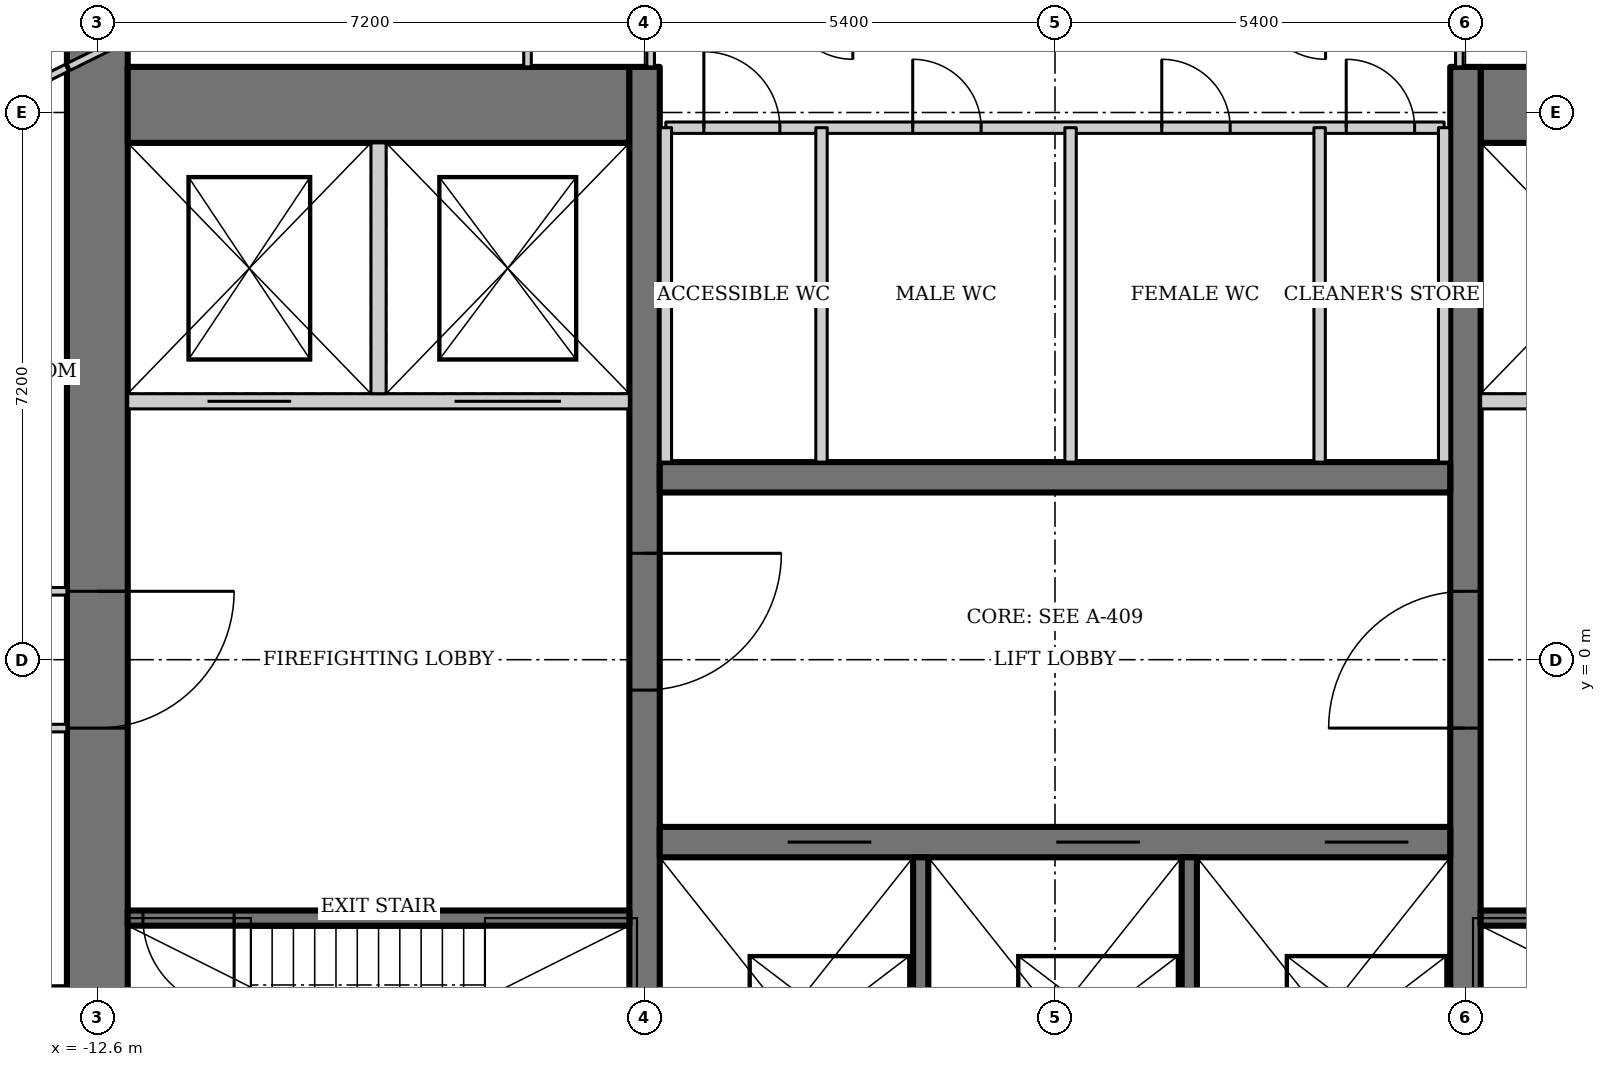
"""IFC4 building model, lengths in metres.
Left out: names, types, materials, properties, quantities, classifications, styles, units other than length and angle.
Written with IfcOpenShell. Run it as: python <this file> out.ifc"""

import sys

from ifc_helpers import new_model, si_unit, direction, frame, frame_2d, origin, place, context, subcontext, project, spatial, rectangle, extrude, element, fill, save


model = new_model("IFC4")
c1 = context("Model", 3, precision=1e-05, world=origin(), true_north=direction((0.0, 1.0)))
c2 = subcontext(c1, "Body", "Model", "MODEL_VIEW")
j1 = project(units=[si_unit("LENGTHUNIT", "METRE"), si_unit("PLANEANGLEUNIT", "RADIAN")], contexts=[c1])
p1 = place(None, origin())
s1 = spatial("IfcSite", under=j1, at=p1, CompositionType="ELEMENT")
p2 = place(p1, origin())
s2 = spatial("IfcBuilding", under=s1, at=p2, CompositionType="ELEMENT")
p3 = place(p2, frame((0.0, 0.0, 253.6)))
s3 = spatial("IfcBuildingStorey", under=s2, at=p3, CompositionType="ELEMENT", Elevation=253.6)
p4 = place(p3, frame((-12.6, 11.0, 0.0), z_axis=(0.0, 0.0, 1.0), x_axis=(0.0, -1.0, 0.0)))
e1 = element("IfcWall", 1, at=p4, inside=s3, PredefinedType="SHEAR", context=c2, shape_type="SweptSolid", body=[
    extrude(rectangle(XDim=22.0, YDim=0.8, at=frame_2d((11.0, 0.0))), origin(), (0.0, 0.0, 1.0), 4.2),
])
p5 = place(p4, frame((10.1, 0.0, 0.0)))
e2 = element("IfcOpeningElement", 2, at=p5, cuts=e1, PredefinedType="OPENING", context=c2, shape_type="SweptSolid", body=[
    extrude(rectangle(XDim=1.8, YDim=2.1, at=frame_2d((0.9, 1.05))), frame((0.0, 0.41, 0.0), z_axis=(0.0, -1.0, 0.0), x_axis=(1.0, 0.0, 0.0)), (0.0, 0.0, 1.0), 0.82),
])
for number, where, z_axis, x_axis in (
    (3, (12.2, 7.3, 0.0), (0.0, 0.0, 1.0), (-1.0, 0.0, 0.0)),
    (4, (-5.6, 7.3, 0.0), (0.0, 0.0, 1.0), (-1.0, 0.0, 0.0)),
):
    element("IfcWall", number, at=place(p3, frame(where, z_axis=z_axis, x_axis=x_axis)), inside=s3, PredefinedType="SHEAR", context=c2, shape_type="SweptSolid", body=[
        extrude(rectangle(XDim=6.6, YDim=1.0, at=frame_2d((3.3, 0.0))), origin(), (0.0, 0.0, 1.0), 4.2),
    ])
p6 = place(p3, frame((5.4, -6.8, 0.0), z_axis=(0.0, 0.0, 1.0), x_axis=(0.0, 1.0, 0.0)))
e5 = element("IfcWall", 5, at=p6, inside=s3, PredefinedType="SHEAR", context=c2, shape_type="SweptSolid", body=[
    extrude(rectangle(XDim=14.6, YDim=0.4, at=frame_2d((7.3, 0.0))), origin(), (0.0, 0.0, 1.0), 4.2),
])
p7 = place(p6, frame((5.9, 0.0, 0.0)))
e6 = element("IfcOpeningElement", 6, at=p7, cuts=e5, PredefinedType="OPENING", context=c2, shape_type="SweptSolid", body=[
    extrude(rectangle(XDim=1.8, YDim=2.1, at=frame_2d((0.9, 1.05))), frame((0.0, 0.21, 0.0), z_axis=(0.0, -1.0, 0.0), x_axis=(1.0, 0.0, 0.0)), (0.0, 0.0, 1.0), 0.42),
])
p8 = place(p3, frame((-5.4, 7.8, 0.0), z_axis=(0.0, 0.0, 1.0), x_axis=(0.0, -1.0, 0.0)))
e7 = element("IfcWall", 7, at=p8, inside=s3, PredefinedType="SHEAR", context=c2, shape_type="SweptSolid", body=[
    extrude(rectangle(XDim=14.6, YDim=0.4, at=frame_2d((7.3, 0.0))), origin(), (0.0, 0.0, 1.0), 4.2),
])
p9 = place(p8, frame((6.4, 0.0, 0.0)))
e8 = element("IfcOpeningElement", 8, at=p9, cuts=e7, PredefinedType="OPENING", context=c2, shape_type="SweptSolid", body=[
    extrude(rectangle(XDim=1.8, YDim=2.1, at=frame_2d((0.9, 1.05))), frame((0.0, 0.21, 0.0), z_axis=(0.0, -1.0, 0.0), x_axis=(1.0, 0.0, 0.0)), (0.0, 0.0, 1.0), 0.42),
])
p10 = place(p3, frame((-5.2, -2.4, 0.0), z_axis=(0.0, 0.0, 1.0), x_axis=(1.0, 0.0, 0.0)))
e9 = element("IfcWall", 9, at=p10, inside=s3, PredefinedType="SHEAR", context=c2, shape_type="SweptSolid", body=[
    extrude(rectangle(XDim=10.4, YDim=0.4, at=frame_2d((5.2, 0.0))), origin(), (0.0, 0.0, 1.0), 4.2),
])
p11 = place(p10, frame((1.683, 0.0, 0.0)))
e10 = element("IfcOpeningElement", 10, at=p11, cuts=e9, PredefinedType="OPENING", context=c2, shape_type="SweptSolid", body=[
    extrude(rectangle(XDim=1.1, YDim=2.2, at=frame_2d((0.55, 1.1))), frame((0.0, 0.21, 0.0), z_axis=(0.0, -1.0, 0.0), x_axis=(1.0, 0.0, 0.0)), (0.0, 0.0, 1.0), 0.42),
])
p12 = place(p10, frame((5.217, 0.0, 0.0)))
e11 = element("IfcOpeningElement", 11, at=p12, cuts=e9, PredefinedType="OPENING", context=c2, shape_type="SweptSolid", body=[
    extrude(rectangle(XDim=1.1, YDim=2.2, at=frame_2d((0.55, 1.1))), frame((0.0, 0.21, 0.0), z_axis=(0.0, -1.0, 0.0), x_axis=(1.0, 0.0, 0.0)), (0.0, 0.0, 1.0), 0.42),
])
p13 = place(p10, frame((8.75, 0.0, 0.0)))
e12 = element("IfcOpeningElement", 12, at=p13, cuts=e9, PredefinedType="OPENING", context=c2, shape_type="SweptSolid", body=[
    extrude(rectangle(XDim=1.1, YDim=2.2, at=frame_2d((0.55, 1.1))), frame((0.0, 0.21, 0.0), z_axis=(0.0, -1.0, 0.0), x_axis=(1.0, 0.0, 0.0)), (0.0, 0.0, 1.0), 0.42),
])
for number, where, z_axis, x_axis in (
    (13, (-1.767, -2.6, 0.0), (0.0, 0.0, 1.0), (0.0, -1.0, 0.0)),
    (14, (1.767, -2.6, 0.0), (0.0, 0.0, 1.0), (0.0, -1.0, 0.0)),
):
    element("IfcWall", number, at=place(p3, frame(where, z_axis=z_axis, x_axis=x_axis)), inside=s3, PredefinedType="SOLIDWALL", context=c2, shape_type="SweptSolid", body=[
        extrude(rectangle(XDim=4.2, YDim=0.2, at=frame_2d((2.1, 0.0))), origin(), (0.0, 0.0, 1.0), 4.2),
    ])
p14 = place(p3, frame((5.2, 2.4, 0.0), z_axis=(0.0, 0.0, 1.0), x_axis=(-1.0, 0.0, 0.0)))
e15 = element("IfcWall", 15, at=p14, inside=s3, PredefinedType="SHEAR", context=c2, shape_type="SweptSolid", body=[
    extrude(rectangle(XDim=10.4, YDim=0.4, at=frame_2d((5.2, 0.0))), origin(), (0.0, 0.0, 1.0), 4.2),
])
p15 = place(p3, frame((5.6, -3.4, 0.0), z_axis=(0.0, 0.0, 1.0), x_axis=(1.0, 0.0, 0.0)))
e16 = element("IfcWall", 16, at=p15, inside=s3, PredefinedType="SHEAR", context=c2, shape_type="SweptSolid", body=[
    extrude(rectangle(XDim=6.6, YDim=0.2, at=frame_2d((3.3, 0.0))), origin(), (0.0, 0.0, 1.0), 4.2),
])
p16 = place(p15, frame((5.2, 0.0, 0.0)))
e17 = element("IfcOpeningElement", 17, at=p16, cuts=e16, PredefinedType="OPENING", context=c2, shape_type="SweptSolid", body=[
    extrude(rectangle(XDim=1.2, YDim=2.1, at=frame_2d((0.6, 1.05))), frame((0.0, 0.11, 0.0), z_axis=(0.0, -1.0, 0.0), x_axis=(1.0, 0.0, 0.0)), (0.0, 0.0, 1.0), 0.22),
])
p17 = place(p3, frame((12.2, 3.4, 0.0), z_axis=(0.0, 0.0, 1.0), x_axis=(-1.0, 0.0, 0.0)))
e18 = element("IfcWall", 18, at=p17, inside=s3, PredefinedType="SOLIDWALL", context=c2, shape_type="SweptSolid", body=[
    extrude(rectangle(XDim=6.6, YDim=0.2, at=frame_2d((3.3, 0.0))), origin(), (0.0, 0.0, 1.0), 4.2),
])
p18 = place(p17, frame((4.45, 0.0, 0.0)))
e19 = element("IfcOpeningElement", 19, at=p18, cuts=e18, PredefinedType="OPENING", context=c2, shape_type="SweptSolid", body=[
    extrude(rectangle(XDim=1.1, YDim=2.2, at=frame_2d((0.55, 1.1))), frame((0.0, 0.11, 0.0), z_axis=(0.0, -1.0, 0.0), x_axis=(1.0, 0.0, 0.0)), (0.0, 0.0, 1.0), 0.22),
])
p19 = place(p17, frame((0.9, 0.0, 0.0)))
e20 = element("IfcOpeningElement", 20, at=p19, cuts=e18, PredefinedType="OPENING", context=c2, shape_type="SweptSolid", body=[
    extrude(rectangle(XDim=1.4, YDim=2.2, at=frame_2d((0.7, 1.1))), frame((0.0, 0.11, 0.0), z_axis=(0.0, -1.0, 0.0), x_axis=(1.0, 0.0, 0.0)), (0.0, 0.0, 1.0), 0.22),
])
p20 = place(p3, frame((-5.6, -3.4, 0.0), z_axis=(0.0, 0.0, 1.0), x_axis=(-1.0, 0.0, 0.0)))
e21 = element("IfcWall", 21, at=p20, inside=s3, PredefinedType="SHEAR", context=c2, shape_type="SweptSolid", body=[
    extrude(rectangle(XDim=6.6, YDim=0.2, at=frame_2d((3.3, 0.0))), origin(), (0.0, 0.0, 1.0), 4.2),
])
p21 = place(p20, frame((5.2, 0.0, 0.0)))
e22 = element("IfcOpeningElement", 22, at=p21, cuts=e21, PredefinedType="OPENING", context=c2, shape_type="SweptSolid", body=[
    extrude(rectangle(XDim=1.2, YDim=2.1, at=frame_2d((0.6, 1.05))), frame((0.0, 0.11, 0.0), z_axis=(0.0, -1.0, 0.0), x_axis=(1.0, 0.0, 0.0)), (0.0, 0.0, 1.0), 0.22),
])
p22 = place(p3, frame((-12.2, 3.4, 0.0), z_axis=(0.0, 0.0, 1.0), x_axis=(1.0, 0.0, 0.0)))
e23 = element("IfcWall", 23, at=p22, inside=s3, PredefinedType="SOLIDWALL", context=c2, shape_type="SweptSolid", body=[
    extrude(rectangle(XDim=6.6, YDim=0.2, at=frame_2d((3.3, 0.0))), origin(), (0.0, 0.0, 1.0), 4.2),
])
p23 = place(p22, frame((1.05, 0.0, 0.0)))
e24 = element("IfcOpeningElement", 24, at=p23, cuts=e23, PredefinedType="OPENING", context=c2, shape_type="SweptSolid", body=[
    extrude(rectangle(XDim=1.1, YDim=2.2, at=frame_2d((0.55, 1.1))), frame((0.0, 0.11, 0.0), z_axis=(0.0, -1.0, 0.0), x_axis=(1.0, 0.0, 0.0)), (0.0, 0.0, 1.0), 0.22),
])
p24 = place(p22, frame((4.3, 0.0, 0.0)))
e25 = element("IfcOpeningElement", 25, at=p24, cuts=e23, PredefinedType="OPENING", context=c2, shape_type="SweptSolid", body=[
    extrude(rectangle(XDim=1.4, YDim=2.2, at=frame_2d((0.7, 1.1))), frame((0.0, 0.11, 0.0), z_axis=(0.0, -1.0, 0.0), x_axis=(1.0, 0.0, 0.0)), (0.0, 0.0, 1.0), 0.22),
])
p25 = place(p3, frame((-8.9, 3.5, 0.0), z_axis=(0.0, 0.0, 1.0), x_axis=(0.0, 1.0, 0.0)))
e26 = element("IfcWall", 26, at=p25, inside=s3, PredefinedType="SOLIDWALL", context=c2, shape_type="SweptSolid", body=[
    extrude(rectangle(XDim=3.3, YDim=0.2, at=frame_2d((1.65, 0.0))), origin(), (0.0, 0.0, 1.0), 4.2),
])
p26 = place(p3, frame((-5.12, 7.0, 0.0), z_axis=(0.0, 0.0, 1.0), x_axis=(1.0, 0.0, 0.0)))
e27 = element("IfcWall", 27, at=p26, inside=s3, PredefinedType="SOLIDWALL", context=c2, shape_type="SweptSolid", body=[
    extrude(rectangle(XDim=10.24, YDim=0.15, at=frame_2d((5.12, 0.0))), origin(), (0.0, 0.0, 1.0), 4.05),
])
p27 = place(p26, frame((0.5, 0.0, 0.0)))
e28 = element("IfcOpeningElement", 28, at=p27, cuts=e27, PredefinedType="OPENING", context=c2, shape_type="SweptSolid", body=[
    extrude(rectangle(XDim=1.0, YDim=2.1, at=frame_2d((0.5, 1.05))), frame((0.0, 0.085, 0.0), z_axis=(0.0, -1.0, 0.0), x_axis=(1.0, 0.0, 0.0)), (0.0, 0.0, 1.0), 0.17),
])
p28 = place(p26, frame((3.248, 0.0, 0.0)))
e29 = element("IfcOpeningElement", 29, at=p28, cuts=e27, PredefinedType="OPENING", context=c2, shape_type="SweptSolid", body=[
    extrude(rectangle(XDim=0.9, YDim=2.1, at=frame_2d((0.45, 1.05))), frame((0.0, 0.085, 0.0), z_axis=(0.0, -1.0, 0.0), x_axis=(1.0, 0.0, 0.0)), (0.0, 0.0, 1.0), 0.17),
])
p29 = place(p26, frame((6.525, 0.0, 0.0)))
e30 = element("IfcOpeningElement", 30, at=p29, cuts=e27, PredefinedType="OPENING", context=c2, shape_type="SweptSolid", body=[
    extrude(rectangle(XDim=0.9, YDim=2.1, at=frame_2d((0.45, 1.05))), frame((0.0, 0.085, 0.0), z_axis=(0.0, -1.0, 0.0), x_axis=(1.0, 0.0, 0.0)), (0.0, 0.0, 1.0), 0.17),
])
p30 = place(p26, frame((8.952, 0.0, 0.0)))
e31 = element("IfcOpeningElement", 31, at=p30, cuts=e27, PredefinedType="OPENING", context=c2, shape_type="SweptSolid", body=[
    extrude(rectangle(XDim=0.9, YDim=2.1, at=frame_2d((0.45, 1.05))), frame((0.0, 0.085, 0.0), z_axis=(0.0, -1.0, 0.0), x_axis=(1.0, 0.0, 0.0)), (0.0, 0.0, 1.0), 0.17),
])
for number, where, z_axis, x_axis in (
    (32, (-5.12, 2.6, 0.0), (0.0, 0.0, 1.0), (0.0, 1.0, 0.0)),
    (33, (5.12, 2.6, 0.0), (0.0, 0.0, 1.0), (0.0, 1.0, 0.0)),
    (34, (-3.072, 2.6, 0.0), (0.0, 0.0, 1.0), (0.0, 1.0, 0.0)),
    (35, (0.205, 2.6, 0.0), (0.0, 0.0, 1.0), (0.0, 1.0, 0.0)),
    (36, (3.482, 2.6, 0.0), (0.0, 0.0, 1.0), (0.0, 1.0, 0.0)),
):
    element("IfcWall", number, at=place(p3, frame(where, z_axis=z_axis, x_axis=x_axis)), inside=s3, PredefinedType="SOLIDWALL", context=c2, shape_type="SweptSolid", body=[
        extrude(rectangle(XDim=4.4, YDim=0.15, at=frame_2d((2.2, 0.0))), origin(), (0.0, 0.0, 1.0), 4.05),
    ])
p31 = place(p3, frame((-16.729, -4.34, 0.0), z_axis=(0.0, 0.0, 1.0), x_axis=(1.0, 0.0, 0.0)))
e37 = element("IfcWall", 37, at=p31, inside=s3, PredefinedType="PARTITIONING", context=c2, shape_type="SweptSolid", body=[
    extrude(rectangle(XDim=3.729, YDim=0.1, at=frame_2d((1.865, 0.0))), origin(), (0.0, 0.0, 1.0), 4.05),
])
p32 = place(p3, frame((5.32, 7.8, 0.0), z_axis=(0.0, 0.0, 1.0), x_axis=(0.0, 1.0, 0.0)))
e38 = element("IfcWall", 38, at=p32, inside=s3, PredefinedType="PARTITIONING", context=c2, shape_type="SweptSolid", body=[
    extrude(rectangle(XDim=1.0, YDim=0.1, at=frame_2d((0.5, 0.0))), origin(), (0.0, 0.0, 1.0), 4.05),
])
p33 = place(p3, frame((-6.94, 10.276, 0.0), z_axis=(0.0, 0.0, 1.0), x_axis=(0.0, -1.0, 0.0)))
e39 = element("IfcWall", 39, at=p33, inside=s3, PredefinedType="PARTITIONING", context=c2, shape_type="SweptSolid", body=[
    extrude(rectangle(XDim=2.476, YDim=0.1, at=frame_2d((1.238, 0.0))), origin(), (0.0, 0.0, 1.0), 4.05),
])
p34 = place(p3, frame((-12.977, 7.8, 0.0), z_axis=(0.0, 0.0, 1.0), x_axis=(0.895529831139, 0.445001484874, 0.0)))
e40 = element("IfcWall", 40, at=p34, inside=s3, PredefinedType="PARTITIONING", context=c2, shape_type="SweptSolid", body=[
    extrude(rectangle(XDim=4.108, YDim=0.1, at=frame_2d((2.054, 0.0))), origin(), (0.0, 0.0, 1.0), 4.05),
])
p35 = place(p34, frame((1.604, 0.0, 0.0)))
e41 = element("IfcOpeningElement", 41, at=p35, cuts=e40, PredefinedType="OPENING", context=c2, shape_type="SweptSolid", body=[
    extrude(rectangle(XDim=0.9, YDim=2.1, at=frame_2d((0.45, 1.05))), frame((0.0, 0.06, 0.0), z_axis=(0.0, -1.0, 0.0), x_axis=(1.0, 0.0, 0.0)), (0.0, 0.0, 1.0), 0.12),
])
p36 = place(p3, frame((-5.32, 8.8, 0.0), z_axis=(0.0, 0.0, 1.0), x_axis=(0.0, -1.0, 0.0)))
e42 = element("IfcWall", 42, at=p36, inside=s3, PredefinedType="PARTITIONING", context=c2, shape_type="SweptSolid", body=[
    extrude(rectangle(XDim=1.0, YDim=0.1, at=frame_2d((0.5, 0.0))), origin(), (0.0, 0.0, 1.0), 4.05),
])
p37 = place(p3, frame((-13.337, 7.621, 0.0), z_axis=(0.0, 0.0, 1.0), x_axis=(0.895721570004, 0.444615416995, 0.0)))
e43 = element("IfcWall", 43, at=p37, inside=s3, PredefinedType="PARTITIONING", context=c2, shape_type="SweptSolid", body=[
    extrude(rectangle(XDim=0.376, YDim=0.1, at=frame_2d((0.188, 0.0))), origin(), (0.0, 0.0, 1.0), 4.05),
])
p38 = place(p3, frame((-15.165, -0.9, 0.0), z_axis=(0.0, 0.0, 1.0), x_axis=(1.0, 0.0, 0.0)))
e44 = element("IfcWall", 44, at=p38, inside=s3, PredefinedType="PARTITIONING", context=c2, shape_type="SweptSolid", body=[
    extrude(rectangle(XDim=2.165, YDim=0.1, at=frame_2d((1.083, 0.0))), origin(), (0.0, 0.0, 1.0), 4.05),
])
p39 = place(p38, frame((0.1, 0.0, 0.0)))
e45 = element("IfcOpeningElement", 45, at=p39, cuts=e44, PredefinedType="OPENING", context=c2, shape_type="SweptSolid", body=[
    extrude(rectangle(XDim=0.9, YDim=2.1, at=frame_2d((0.45, 1.05))), frame((0.0, 0.06, 0.0), z_axis=(0.0, -1.0, 0.0), x_axis=(1.0, 0.0, 0.0)), (0.0, 0.0, 1.0), 0.12),
])
p40 = place(p3, frame((-13.0, 0.9, 0.0), z_axis=(0.0, 0.0, 1.0), x_axis=(-1.0, 0.0, 0.0)))
e46 = element("IfcWall", 46, at=p40, inside=s3, PredefinedType="PARTITIONING", context=c2, shape_type="SweptSolid", body=[
    extrude(rectangle(XDim=2.165, YDim=0.1, at=frame_2d((1.083, 0.0))), origin(), (0.0, 0.0, 1.0), 4.05),
])
p41 = place(p40, frame((1.15, 0.0, 0.0)))
e47 = element("IfcOpeningElement", 47, at=p41, cuts=e46, PredefinedType="OPENING", context=c2, shape_type="SweptSolid", body=[
    extrude(rectangle(XDim=0.9, YDim=2.1, at=frame_2d((0.45, 1.05))), frame((0.0, 0.06, 0.0), z_axis=(0.0, -1.0, 0.0), x_axis=(1.0, 0.0, 0.0)), (0.0, 0.0, 1.0), 0.12),
])
p42 = place(p7, origin())
e48 = element("IfcDoor", 48, at=p42, inside=s3, OperationType="DOUBLE_DOOR_DOUBLE_SWING", PredefinedType="DOOR", context=c2, shape_type="SweptSolid", body=[
    extrude(rectangle(XDim=1.8, YDim=2.1, at=frame_2d((0.9, 1.05))), frame((0.0, 0.025, 0.0), z_axis=(0.0, -1.0, 0.0), x_axis=(1.0, 0.0, 0.0)), (0.0, 0.0, 1.0), 0.05),
])
fill(e6, e48)
p43 = place(p9, origin())
e49 = element("IfcDoor", 49, at=p43, inside=s3, OperationType="DOUBLE_DOOR_DOUBLE_SWING", PredefinedType="DOOR", context=c2, shape_type="SweptSolid", body=[
    extrude(rectangle(XDim=1.8, YDim=2.1, at=frame_2d((0.9, 1.05))), frame((0.0, 0.025, 0.0), z_axis=(0.0, -1.0, 0.0), x_axis=(1.0, 0.0, 0.0)), (0.0, 0.0, 1.0), 0.05),
])
fill(e8, e49)
p44 = place(p21, origin())
e50 = element("IfcDoor", 50, at=p44, inside=s3, OperationType="SINGLE_SWING_RIGHT", PredefinedType="DOOR", context=c2, shape_type="SweptSolid", body=[
    extrude(rectangle(XDim=1.2, YDim=2.1, at=frame_2d((0.6, 1.05))), frame((0.0, 0.025, 0.0), z_axis=(0.0, -1.0, 0.0), x_axis=(1.0, 0.0, 0.0)), (0.0, 0.0, 1.0), 0.05),
])
fill(e22, e50)
p45 = place(p5, origin())
e51 = element("IfcDoor", 51, at=p45, inside=s3, OperationType="DOUBLE_DOOR_DOUBLE_SWING", PredefinedType="DOOR", context=c2, shape_type="SweptSolid", body=[
    extrude(rectangle(XDim=1.8, YDim=2.1, at=frame_2d((0.9, 1.05))), frame((0.0, 0.025, 0.0), z_axis=(0.0, -1.0, 0.0), x_axis=(1.0, 0.0, 0.0)), (0.0, 0.0, 1.0), 0.05),
])
fill(e2, e51)
p46 = place(p11, origin())
e52 = element("IfcDoor", 52, at=p46, inside=s3, OperationType="DOUBLE_DOOR_SLIDING", PredefinedType="DOOR", context=c2, shape_type="SweptSolid", body=[
    extrude(rectangle(XDim=1.1, YDim=2.2, at=frame_2d((0.55, 1.1))), frame((0.0, 0.025, 0.0), z_axis=(0.0, -1.0, 0.0), x_axis=(1.0, 0.0, 0.0)), (0.0, 0.0, 1.0), 0.05),
])
fill(e10, e52)
p47 = place(p12, origin())
e53 = element("IfcDoor", 53, at=p47, inside=s3, OperationType="DOUBLE_DOOR_SLIDING", PredefinedType="DOOR", context=c2, shape_type="SweptSolid", body=[
    extrude(rectangle(XDim=1.1, YDim=2.2, at=frame_2d((0.55, 1.1))), frame((0.0, 0.025, 0.0), z_axis=(0.0, -1.0, 0.0), x_axis=(1.0, 0.0, 0.0)), (0.0, 0.0, 1.0), 0.05),
])
fill(e11, e53)
p48 = place(p13, origin())
e54 = element("IfcDoor", 54, at=p48, inside=s3, OperationType="DOUBLE_DOOR_SLIDING", PredefinedType="DOOR", context=c2, shape_type="SweptSolid", body=[
    extrude(rectangle(XDim=1.1, YDim=2.2, at=frame_2d((0.55, 1.1))), frame((0.0, 0.025, 0.0), z_axis=(0.0, -1.0, 0.0), x_axis=(1.0, 0.0, 0.0)), (0.0, 0.0, 1.0), 0.05),
])
fill(e12, e54)
p49 = place(p23, origin())
e55 = element("IfcDoor", 55, at=p49, inside=s3, OperationType="DOUBLE_DOOR_SLIDING", PredefinedType="DOOR", context=c2, shape_type="SweptSolid", body=[
    extrude(rectangle(XDim=1.1, YDim=2.2, at=frame_2d((0.55, 1.1))), frame((0.0, 0.025, 0.0), z_axis=(0.0, -1.0, 0.0), x_axis=(1.0, 0.0, 0.0)), (0.0, 0.0, 1.0), 0.05),
])
fill(e24, e55)
p50 = place(p24, origin())
e56 = element("IfcDoor", 56, at=p50, inside=s3, OperationType="DOUBLE_DOOR_SLIDING", PredefinedType="DOOR", context=c2, shape_type="SweptSolid", body=[
    extrude(rectangle(XDim=1.4, YDim=2.2, at=frame_2d((0.7, 1.1))), frame((0.0, 0.025, 0.0), z_axis=(0.0, -1.0, 0.0), x_axis=(1.0, 0.0, 0.0)), (0.0, 0.0, 1.0), 0.05),
])
fill(e25, e56)
p51 = place(p27, origin())
e57 = element("IfcDoor", 57, at=p51, inside=s3, OperationType="SINGLE_SWING_LEFT", PredefinedType="DOOR", context=c2, shape_type="SweptSolid", body=[
    extrude(rectangle(XDim=1.0, YDim=2.1, at=frame_2d((0.5, 1.05))), frame((0.0, 0.025, 0.0), z_axis=(0.0, -1.0, 0.0), x_axis=(1.0, 0.0, 0.0)), (0.0, 0.0, 1.0), 0.05),
])
fill(e28, e57)
p52 = place(p28, origin())
e58 = element("IfcDoor", 58, at=p52, inside=s3, OperationType="SINGLE_SWING_LEFT", PredefinedType="DOOR", context=c2, shape_type="SweptSolid", body=[
    extrude(rectangle(XDim=0.9, YDim=2.1, at=frame_2d((0.45, 1.05))), frame((0.0, 0.025, 0.0), z_axis=(0.0, -1.0, 0.0), x_axis=(1.0, 0.0, 0.0)), (0.0, 0.0, 1.0), 0.05),
])
fill(e29, e58)
p53 = place(p29, origin())
e59 = element("IfcDoor", 59, at=p53, inside=s3, OperationType="SINGLE_SWING_LEFT", PredefinedType="DOOR", context=c2, shape_type="SweptSolid", body=[
    extrude(rectangle(XDim=0.9, YDim=2.1, at=frame_2d((0.45, 1.05))), frame((0.0, 0.025, 0.0), z_axis=(0.0, -1.0, 0.0), x_axis=(1.0, 0.0, 0.0)), (0.0, 0.0, 1.0), 0.05),
])
fill(e30, e59)
p54 = place(p30, origin())
e60 = element("IfcDoor", 60, at=p54, inside=s3, OperationType="SINGLE_SWING_LEFT", PredefinedType="DOOR", context=c2, shape_type="SweptSolid", body=[
    extrude(rectangle(XDim=0.9, YDim=2.1, at=frame_2d((0.45, 1.05))), frame((0.0, 0.025, 0.0), z_axis=(0.0, -1.0, 0.0), x_axis=(1.0, 0.0, 0.0)), (0.0, 0.0, 1.0), 0.05),
])
fill(e31, e60)
save(model, sys.argv[1])
